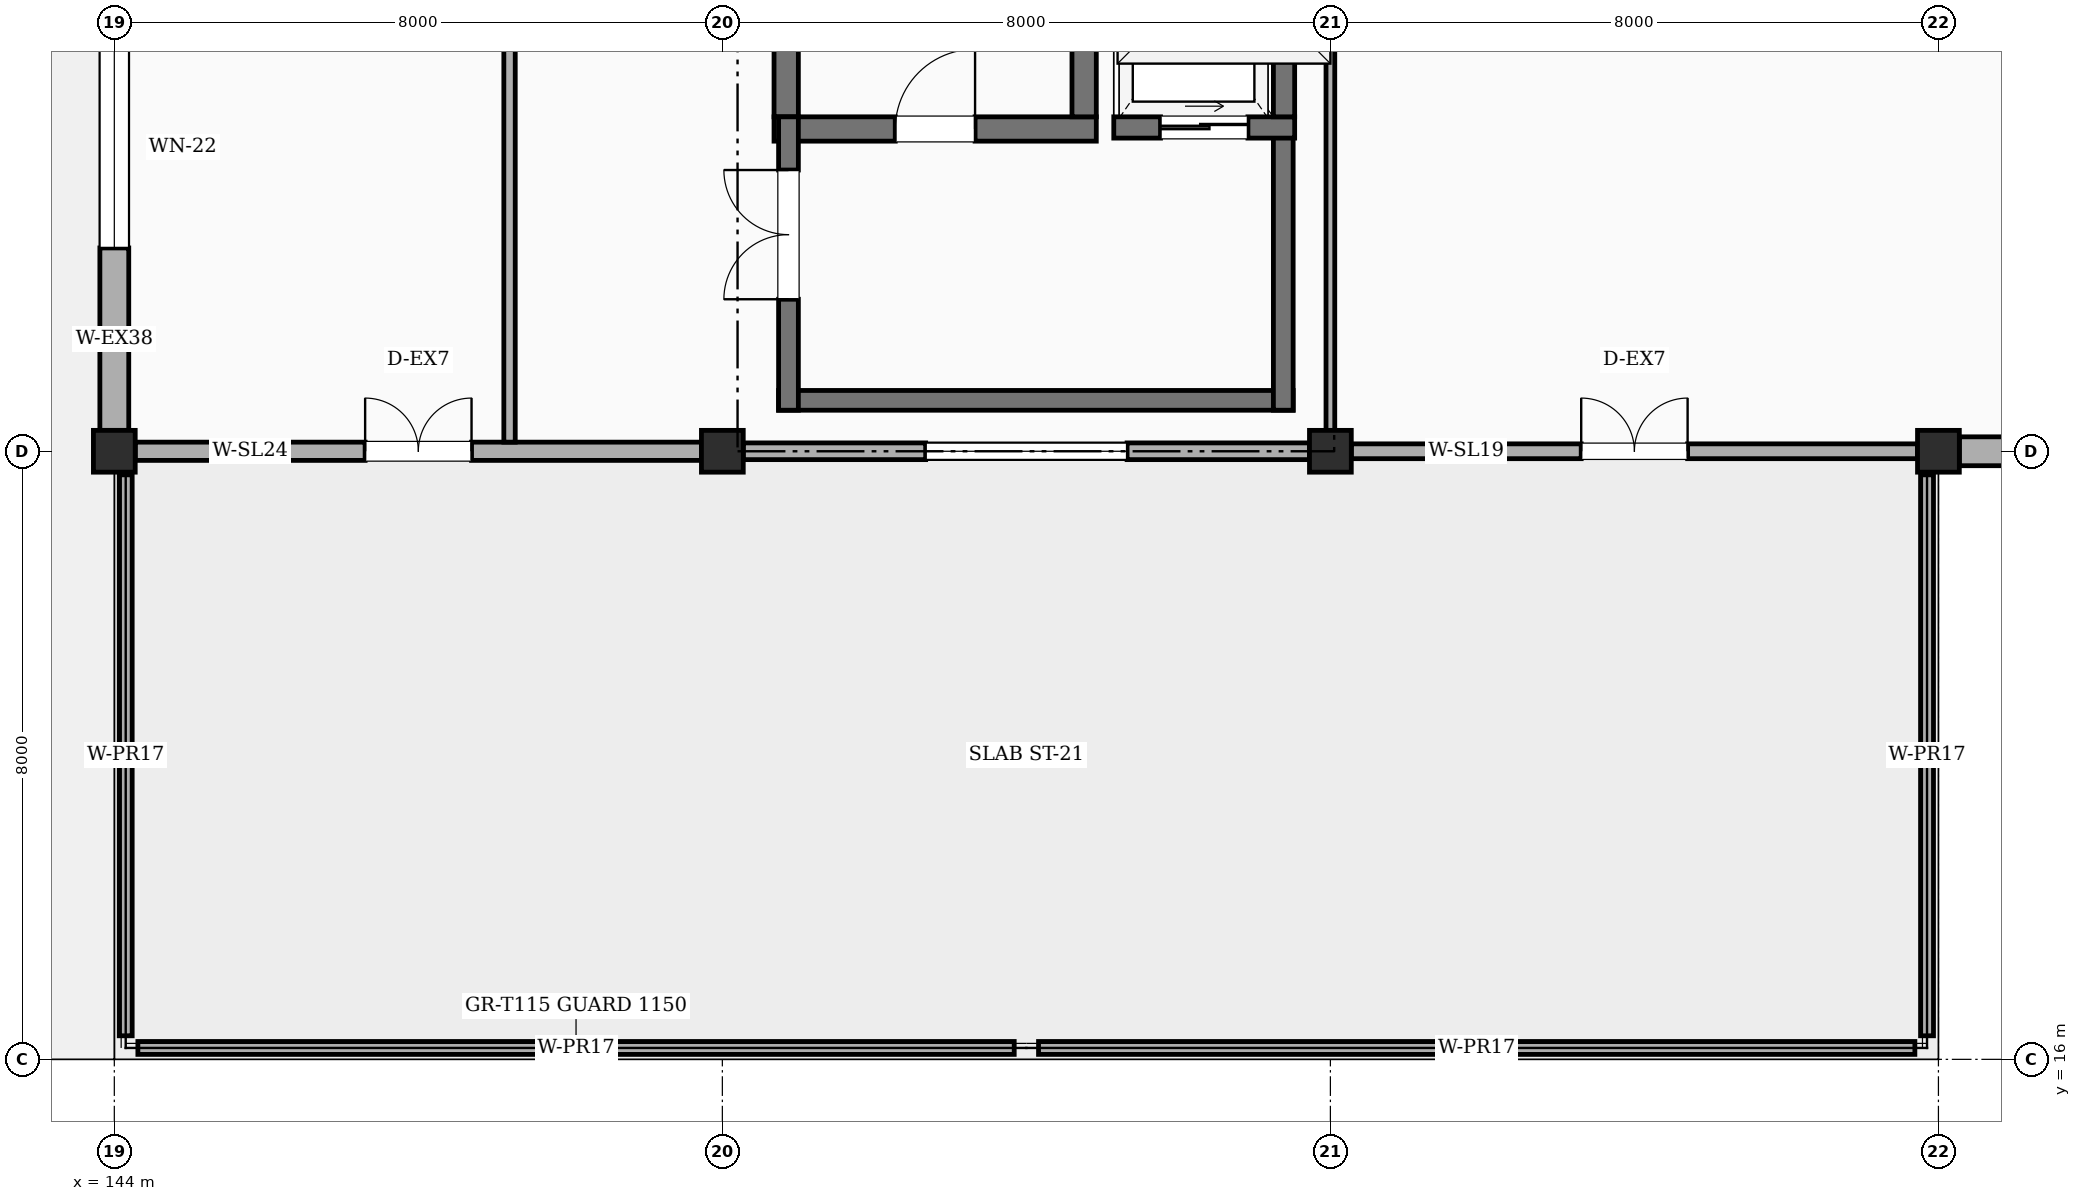
"""IFC4 building model, lengths in metres.
Left out: names, types, materials, properties, quantities, classifications, styles, units other than length and angle.
Written with IfcOpenShell. Run it as: python <this file> out.ifc"""

import sys

from ifc_helpers import new_model, si_unit, direction, frame, frame_2d, origin, origin_2d, place, context, subcontext, project, spatial, rectangle, extrude, element, fill, save


model = new_model("IFC4")
c1 = context("Model", 3, precision=1e-05, world=origin(), true_north=direction((0.0, 1.0)))
c2 = subcontext(c1, "Body", "Model", "MODEL_VIEW")
j1 = project(units=[si_unit("LENGTHUNIT", "METRE"), si_unit("PLANEANGLEUNIT", "RADIAN")], contexts=[c1])
p1 = place(None, origin())
s1 = spatial("IfcSite", under=j1, at=p1, CompositionType="ELEMENT")
p2 = place(p1, origin())
s2 = spatial("IfcBuilding", under=s1, at=p2, CompositionType="ELEMENT")
p3 = place(p2, frame((0.0, 0.0, 23.4)))
s3 = spatial("IfcBuildingStorey", under=s2, at=p3, CompositionType="ELEMENT", Elevation=23.4)
for number, where, z_axis, x_axis in (
    (1, (144.0, 24.0, 0.0), (0.0, 0.0, 1.0), (1.0, 0.0, 0.0)),
    (2, (152.0, 24.0, 0.0), (0.0, 0.0, 1.0), (1.0, 0.0, 0.0)),
    (3, (160.0, 24.0, 0.0), (0.0, 0.0, 1.0), (1.0, 0.0, 0.0)),
    (4, (168.0, 24.0, 0.0), (0.0, 0.0, 1.0), (1.0, 0.0, 0.0)),
):
    element("IfcColumn", number, at=place(p3, frame(where, z_axis=z_axis, x_axis=x_axis)), inside=s3, PredefinedType="COLUMN", context=c2, shape_type="SweptSolid", body=[
        extrude(rectangle(XDim=0.55, YDim=0.55, at=origin_2d()), origin(), (0.0, 0.0, 1.0), 4.2),
    ])
p4 = place(p3, frame((144.275, 24.0, 0.0), z_axis=(0.0, 0.0, 1.0), x_axis=(1.0, 0.0, 0.0)))
e5 = element("IfcWall", 5, at=p4, inside=s3, PredefinedType="SOLIDWALL", context=c2, shape_type="SweptSolid", body=[
    extrude(rectangle(XDim=7.45, YDim=0.24, at=frame_2d((3.725, 0.0))), origin(), (0.0, 0.0, 1.0), 3.429),
])
p5 = place(p4, frame((3.025, 0.0, 0.0)))
e6 = element("IfcOpeningElement", 6, at=p5, cuts=e5, PredefinedType="OPENING", context=c2, shape_type="SweptSolid", body=[
    extrude(rectangle(XDim=1.4, YDim=2.25, at=frame_2d((0.7, 1.125))), frame((0.0, 0.13, 0.0), z_axis=(0.0, -1.0, 0.0), x_axis=(1.0, 0.0, 0.0)), (0.0, 0.0, 1.0), 0.26),
])
p6 = place(p3, frame((152.275, 24.0, 0.0), z_axis=(0.0, 0.0, 1.0), x_axis=(1.0, 0.0, 0.0)))
e7 = element("IfcWall", 7, at=p6, inside=s3, PredefinedType="SOLIDWALL", context=c2, shape_type="SweptSolid", body=[
    extrude(rectangle(XDim=7.45, YDim=0.22, at=frame_2d((3.725, 0.0))), origin(), (0.0, 0.0, 1.0), 3.97),
])
p7 = place(p6, frame((2.4, 0.0, 0.95)))
e8 = element("IfcOpeningElement", 8, at=p7, cuts=e7, PredefinedType="OPENING", context=c2, shape_type="SweptSolid", body=[
    extrude(rectangle(XDim=2.65, YDim=1.95, at=frame_2d((1.325, 0.975))), frame((0.0, 0.12, 0.0), z_axis=(0.0, -1.0, 0.0), x_axis=(1.0, 0.0, 0.0)), (0.0, 0.0, 1.0), 0.24),
])
p8 = place(p3, frame((160.275, 24.0, 0.0), z_axis=(0.0, 0.0, 1.0), x_axis=(1.0, 0.0, 0.0)))
e9 = element("IfcWall", 9, at=p8, inside=s3, PredefinedType="SOLIDWALL", context=c2, shape_type="SweptSolid", body=[
    extrude(rectangle(XDim=7.45, YDim=0.195, at=frame_2d((3.725, 0.0))), origin(), (0.0, 0.0, 1.0), 3.97),
])
p9 = place(p8, frame((3.025, 0.0, 0.0)))
e10 = element("IfcOpeningElement", 10, at=p9, cuts=e9, PredefinedType="OPENING", context=c2, shape_type="SweptSolid", body=[
    extrude(rectangle(XDim=1.4, YDim=2.25, at=frame_2d((0.7, 1.125))), frame((0.0, 0.107, 0.0), z_axis=(0.0, -1.0, 0.0), x_axis=(1.0, 0.0, 0.0)), (0.0, 0.0, 1.0), 0.215),
])
p10 = place(p3, frame((168.275, 24.0, 0.0), z_axis=(0.0, 0.0, 1.0), x_axis=(1.0, 0.0, 0.0)))
e11 = element("IfcWall", 11, at=p10, inside=s3, PredefinedType="STANDARD", context=c2, shape_type="SweptSolid", body=[
    extrude(rectangle(XDim=7.45, YDim=0.38, at=frame_2d((3.725, 0.0))), origin(), (0.0, 0.0, 1.0), 3.429),
])
p11 = place(p10, frame((2.4, 0.0, 0.95)))
e12 = element("IfcOpeningElement", 12, at=p11, cuts=e11, PredefinedType="OPENING", context=c2, shape_type="SweptSolid", body=[
    extrude(rectangle(XDim=2.65, YDim=1.95, at=frame_2d((1.325, 0.975))), frame((0.0, 0.2, 0.0), z_axis=(0.0, -1.0, 0.0), x_axis=(1.0, 0.0, 0.0)), (0.0, 0.0, 1.0), 0.4),
])
p12 = place(p3, frame((144.0, 31.725, 0.0), z_axis=(0.0, 0.0, 1.0), x_axis=(0.0, -1.0, 0.0)))
e13 = element("IfcWall", 13, at=p12, inside=s3, PredefinedType="STANDARD", context=c2, shape_type="SweptSolid", body=[
    extrude(rectangle(XDim=7.45, YDim=0.38, at=frame_2d((3.725, 0.0))), origin(), (0.0, 0.0, 1.0), 3.58),
])
p13 = place(p12, frame((2.4, 0.0, 0.95)))
e14 = element("IfcOpeningElement", 14, at=p13, cuts=e13, PredefinedType="OPENING", context=c2, shape_type="SweptSolid", body=[
    extrude(rectangle(XDim=2.65, YDim=1.95, at=frame_2d((1.325, 0.975))), frame((0.0, 0.2, 0.0), z_axis=(0.0, -1.0, 0.0), x_axis=(1.0, 0.0, 0.0)), (0.0, 0.0, 1.0), 0.4),
])
for number, where, z_axis, x_axis in (
    (15, (144.31, 16.15, 0.0), (0.0, 0.0, 1.0), (1.0, 0.0, 0.0)),
    (16, (156.16, 16.15, 0.0), (0.0, 0.0, 1.0), (1.0, 0.0, 0.0)),
):
    element("IfcWall", number, at=place(p3, frame(where, z_axis=z_axis, x_axis=x_axis)), inside=s3, PredefinedType="PARAPET", context=c2, shape_type="SweptSolid", body=[
        extrude(rectangle(XDim=11.53, YDim=0.17, at=frame_2d((5.765, 0.0))), origin(), (0.0, 0.0, 1.0), 0.42),
    ])
for number, where, z_axis, x_axis in (
    (17, (144.15, 16.31, 0.0), (0.0, 0.0, 1.0), (0.0, 1.0, 0.0)),
    (18, (167.85, 16.31, 0.0), (0.0, 0.0, 1.0), (0.0, 1.0, 0.0)),
):
    element("IfcWall", number, at=place(p3, frame(where, z_axis=z_axis, x_axis=x_axis)), inside=s3, PredefinedType="PARAPET", context=c2, shape_type="SweptSolid", body=[
        extrude(rectangle(XDim=7.38, YDim=0.17, at=frame_2d((3.69, 0.0))), origin(), (0.0, 0.0, 1.0), 0.42),
    ])
p14 = place(p3, frame((152.68, 28.24, 0.0), z_axis=(0.0, 0.0, 1.0), x_axis=(1.0, 0.0, 0.0)))
e19 = element("IfcWall", 19, at=p14, inside=s3, PredefinedType="SHEAR", context=c2, shape_type="SweptSolid", body=[
    extrude(rectangle(XDim=4.24, YDim=0.32, at=frame_2d((2.12, 0.0))), origin(), (0.0, 0.0, 1.0), 4.2),
])
p15 = place(p14, frame((1.595, 0.0, 0.0)))
e20 = element("IfcOpeningElement", 20, at=p15, cuts=e19, PredefinedType="OPENING", context=c2, shape_type="SweptSolid", body=[
    extrude(rectangle(XDim=1.05, YDim=2.15, at=frame_2d((0.525, 1.075))), frame((0.0, 0.17, 0.0), z_axis=(0.0, -1.0, 0.0), x_axis=(1.0, 0.0, 0.0)), (0.0, 0.0, 1.0), 0.34),
])
for number, where, z_axis, x_axis in (
    (21, (152.84, 28.4, 0.0), (0.0, 0.0, 1.0), (0.0, 1.0, 0.0)),
    (22, (156.76, 28.4, 0.0), (0.0, 0.0, 1.0), (0.0, 1.0, 0.0)),
):
    element("IfcWall", number, at=place(p3, frame(where, z_axis=z_axis, x_axis=x_axis)), inside=s3, PredefinedType="SHEAR", context=c2, shape_type="SweptSolid", body=[
        extrude(rectangle(XDim=8.6, YDim=0.32, at=frame_2d((4.3, 0.0))), origin(), (0.0, 0.0, 1.0), 4.2),
    ])
p16 = place(p3, frame((159.51, 24.67, 0.0), z_axis=(0.0, 0.0, 1.0), x_axis=(-1.0, 0.0, 0.0)))
e23 = element("IfcWall", 23, at=p16, inside=s3, PredefinedType="SHEAR", context=c2, shape_type="SweptSolid", body=[
    extrude(rectangle(XDim=6.77, YDim=0.26, at=frame_2d((3.385, 0.0))), origin(), (0.0, 0.0, 1.0), 4.2),
])
p17 = place(p3, frame((152.87, 24.54, 0.0), z_axis=(0.0, 0.0, 1.0), x_axis=(0.0, 1.0, 0.0)))
e24 = element("IfcWall", 24, at=p17, inside=s3, PredefinedType="SHEAR", context=c2, shape_type="SweptSolid", body=[
    extrude(rectangle(XDim=3.86, YDim=0.26, at=frame_2d((1.93, 0.0))), origin(), (0.0, 0.0, 1.0), 4.2),
])
p18 = place(p17, frame((1.46, 0.0, 0.0)))
e25 = element("IfcOpeningElement", 25, at=p18, cuts=e24, PredefinedType="OPENING", context=c2, shape_type="SweptSolid", body=[
    extrude(rectangle(XDim=1.7, YDim=2.2, at=frame_2d((0.85, 1.1))), frame((0.0, 0.14, 0.0), z_axis=(0.0, -1.0, 0.0), x_axis=(1.0, 0.0, 0.0)), (0.0, 0.0, 1.0), 0.28),
])
p19 = place(p3, frame((159.38, 24.54, 0.0), z_axis=(0.0, 0.0, 1.0), x_axis=(0.0, 1.0, 0.0)))
e26 = element("IfcWall", 26, at=p19, inside=s3, PredefinedType="SHEAR", context=c2, shape_type="SweptSolid", body=[
    extrude(rectangle(XDim=3.86, YDim=0.26, at=frame_2d((1.93, 0.0))), origin(), (0.0, 0.0, 1.0), 4.2),
])
p20 = place(p3, frame((157.15, 28.26, 0.0), z_axis=(0.0, 0.0, 1.0), x_axis=(1.0, 0.0, 0.0)))
e27 = element("IfcWall", 27, at=p20, inside=s3, PredefinedType="SHEAR", context=c2, shape_type="SweptSolid", body=[
    extrude(rectangle(XDim=2.38, YDim=0.28, at=frame_2d((1.19, 0.0))), origin(), (0.0, 0.0, 1.0), 4.2),
])
p21 = place(p20, frame((0.615, 0.0, 0.0)))
e28 = element("IfcOpeningElement", 28, at=p21, cuts=e27, PredefinedType="OPENING", context=c2, shape_type="SweptSolid", body=[
    extrude(rectangle(XDim=1.15, YDim=2.2, at=frame_2d((0.575, 1.1))), frame((0.0, 0.15, 0.0), z_axis=(0.0, -1.0, 0.0), x_axis=(1.0, 0.0, 0.0)), (0.0, 0.0, 1.0), 0.3),
])
p22 = place(p3, frame((159.39, 28.4, 0.0), z_axis=(0.0, 0.0, 1.0), x_axis=(0.0, 1.0, 0.0)))
e29 = element("IfcWall", 29, at=p22, inside=s3, PredefinedType="SHEAR", context=c2, shape_type="SweptSolid", body=[
    extrude(rectangle(XDim=2.8, YDim=0.28, at=frame_2d((1.4, 0.0))), origin(), (0.0, 0.0, 1.0), 4.2),
])
p23 = place(p3, frame((149.2, 24.12, 0.0), z_axis=(0.0, 0.0, 1.0), x_axis=(0.0, 1.0, 0.0)))
e30 = element("IfcWall", 30, at=p23, inside=s3, PredefinedType="PARTITIONING", context=c2, shape_type="SweptSolid", body=[
    extrude(rectangle(XDim=25.86, YDim=0.15, at=frame_2d((12.93, 0.0))), origin(), (0.0, 0.0, 1.0), 3.429),
])
p24 = place(p23, frame((12.205, 0.0, 0.0)))
e31 = element("IfcOpeningElement", 31, at=p24, cuts=e30, PredefinedType="OPENING", context=c2, shape_type="SweptSolid", body=[
    extrude(rectangle(XDim=1.45, YDim=2.2, at=frame_2d((0.725, 1.1))), frame((0.0, 0.085, 0.0), z_axis=(0.0, -1.0, 0.0), x_axis=(1.0, 0.0, 0.0)), (0.0, 0.0, 1.0), 0.17),
])
p25 = place(p3, frame((160.0, 24.12, 0.0), z_axis=(0.0, 0.0, 1.0), x_axis=(0.0, 1.0, 0.0)))
e32 = element("IfcWall", 32, at=p25, inside=s3, PredefinedType="PARTITIONING", context=c2, shape_type="SweptSolid", body=[
    extrude(rectangle(XDim=19.06, YDim=0.115, at=frame_2d((9.53, 0.0))), origin(), (0.0, 0.0, 1.0), 3.58),
])
p26 = place(p5, frame((1.4, 0.0, 0.0), z_axis=(0.0, 0.0, 1.0), x_axis=(-1.0, 0.0, 0.0)))
e33 = element("IfcDoor", 33, at=p26, inside=s3, OperationType="DOUBLE_DOOR_SINGLE_SWING", PredefinedType="DOOR", context=c2, shape_type="SweptSolid", body=[
    extrude(rectangle(XDim=1.4, YDim=2.25, at=frame_2d((-0.7, 1.125))), frame((0.0, -0.025, 0.0), z_axis=(0.0, 1.0, 0.0), x_axis=(-1.0, 0.0, 0.0)), (0.0, 0.0, 1.0), 0.05),
])
fill(e6, e33)
p27 = place(p7, origin())
e34 = element("IfcWindow", 34, at=p27, inside=s3, PartitioningType="SINGLE_PANEL", PredefinedType="WINDOW", context=c2, shape_type="SweptSolid", body=[
    extrude(rectangle(XDim=2.65, YDim=1.95, at=frame_2d((1.325, 0.975))), frame((0.0, 0.03, 0.0), z_axis=(0.0, -1.0, 0.0), x_axis=(1.0, 0.0, 0.0)), (0.0, 0.0, 1.0), 0.06),
])
fill(e8, e34)
p28 = place(p9, frame((1.4, 0.0, 0.0), z_axis=(0.0, 0.0, 1.0), x_axis=(-1.0, 0.0, 0.0)))
e35 = element("IfcDoor", 35, at=p28, inside=s3, OperationType="DOUBLE_DOOR_SINGLE_SWING", PredefinedType="DOOR", context=c2, shape_type="SweptSolid", body=[
    extrude(rectangle(XDim=1.4, YDim=2.25, at=frame_2d((-0.7, 1.125))), frame((0.0, -0.025, 0.0), z_axis=(0.0, 1.0, 0.0), x_axis=(-1.0, 0.0, 0.0)), (0.0, 0.0, 1.0), 0.05),
])
fill(e10, e35)
p29 = place(p13, origin())
e36 = element("IfcWindow", 36, at=p29, inside=s3, PartitioningType="SINGLE_PANEL", PredefinedType="WINDOW", context=c2, shape_type="SweptSolid", body=[
    extrude(rectangle(XDim=2.65, YDim=1.95, at=frame_2d((1.325, 0.975))), frame((0.0, 0.03, 0.0), z_axis=(0.0, -1.0, 0.0), x_axis=(1.0, 0.0, 0.0)), (0.0, 0.0, 1.0), 0.06),
])
fill(e14, e36)
p30 = place(p2, frame((0.0, 0.0, 27.6)))
p31 = place(p30, frame((0.0, 0.0, 1.925)))
p32 = place(p31, frame((158.6, 30.5, 0.0)))
p33 = place(p32, frame((0.0, 0.0, 0.175)))
e37 = element("IfcWindow", 37, at=p33, inside=s3, PartitioningType="SINGLE_PANEL", PredefinedType="SKYLIGHT", context=c2, shape_type="SweptSolid", body=[
    extrude(rectangle(XDim=2.8, YDim=2.8, at=origin_2d()), origin(), (0.0, 0.0, 1.0), 0.05),
])
p34 = place(p15, origin())
e38 = element("IfcDoor", 38, at=p34, inside=s3, OperationType="SINGLE_SWING_RIGHT", PredefinedType="DOOR", context=c2, shape_type="SweptSolid", body=[
    extrude(rectangle(XDim=1.05, YDim=2.15, at=frame_2d((0.525, 1.075))), frame((0.0, 0.025, 0.0), z_axis=(0.0, -1.0, 0.0), x_axis=(1.0, 0.0, 0.0)), (0.0, 0.0, 1.0), 0.05),
])
fill(e20, e38)
p35 = place(p18, origin())
e39 = element("IfcDoor", 39, at=p35, inside=s3, OperationType="DOUBLE_DOOR_SINGLE_SWING", PredefinedType="DOOR", context=c2, shape_type="SweptSolid", body=[
    extrude(rectangle(XDim=1.7, YDim=2.2, at=frame_2d((0.85, 1.1))), frame((0.0, 0.025, 0.0), z_axis=(0.0, -1.0, 0.0), x_axis=(1.0, 0.0, 0.0)), (0.0, 0.0, 1.0), 0.05),
])
fill(e25, e39)
p36 = place(p21, origin())
e40 = element("IfcDoor", 40, at=p36, inside=s3, OperationType="SLIDING_TO_LEFT", PredefinedType="DOOR", context=c2, shape_type="SweptSolid", body=[
    extrude(rectangle(XDim=1.15, YDim=2.2, at=frame_2d((0.575, 1.1))), frame((0.0, 0.025, 0.0), z_axis=(0.0, -1.0, 0.0), x_axis=(1.0, 0.0, 0.0)), (0.0, 0.0, 1.0), 0.05),
])
fill(e28, e40)
save(model, sys.argv[1])
